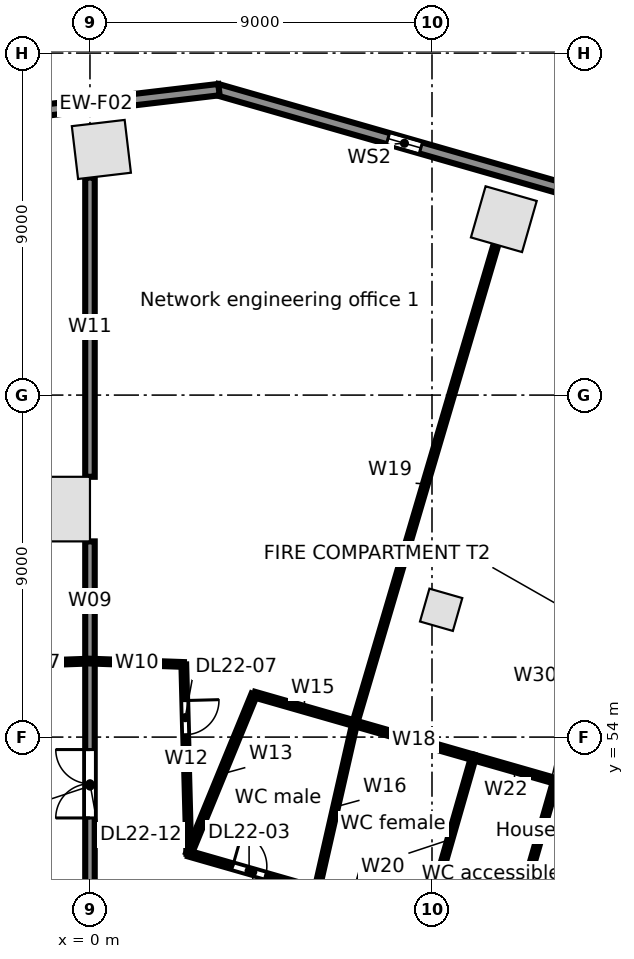
"""IFC4 building model, lengths in metres.
Left out: names, types, materials, properties, quantities, classifications, styles, units other than length and angle.
Written with IfcOpenShell. Run it as: python <this file> out.ifc"""

import sys

from ifc_helpers import new_model, si_unit, direction, frame, frame_2d, origin, origin_2d, place, context, subcontext, project, spatial, rectangle, extrude, element, fill, save


model = new_model("IFC4")
c1 = context("Model", 3, precision=1e-05, world=origin(), true_north=direction((0.0, 1.0)))
c2 = subcontext(c1, "Body", "Model", "MODEL_VIEW")
j1 = project(units=[si_unit("LENGTHUNIT", "METRE"), si_unit("PLANEANGLEUNIT", "RADIAN")], contexts=[c1])
p1 = place(None, origin())
s1 = spatial("IfcSite", under=j1, at=p1, CompositionType="ELEMENT")
p2 = place(p1, origin())
s2 = spatial("IfcBuilding", under=s1, at=p2, CompositionType="ELEMENT")
p3 = place(p2, frame((0.0, 0.0, 110.3)))
s3 = spatial("IfcBuildingStorey", under=s2, at=p3, CompositionType="ELEMENT", Elevation=110.3)
for number, where, z_axis, x_axis in (
    (1, (10.89, 67.629, 0.0), (0.0, 0.0, 1.0), (-0.961, 0.276, 0.0)),
    (2, (0.3, 69.464, 0.0), (0.0, 0.0, 1.0), (-0.993, -0.118, 0.0)),
):
    element("IfcColumn", number, at=place(p3, frame(where, z_axis=z_axis, x_axis=x_axis)), inside=s3, PredefinedType="COLUMN", context=c2, shape_type="SweptSolid", body=[
        extrude(rectangle(XDim=1.4, YDim=1.4, at=origin_2d()), origin(), (0.0, 0.0, 1.0), 4.4),
    ])
p4 = place(p3, frame((-0.85, 60.0, 0.0), z_axis=(0.0, 0.0, 1.0), x_axis=(0.0, 1.0, 0.0)))
e3 = element("IfcColumn", 3, at=p4, inside=s3, PredefinedType="COLUMN", context=c2, shape_type="SweptSolid", body=[
    extrude(rectangle(XDim=1.7, YDim=1.7, at=origin_2d()), origin(), (0.0, 0.0, 1.0), 4.4),
])
p5 = place(p3, frame((9.241, 57.35, 0.0), z_axis=(0.0, 0.0, 1.0), x_axis=(0.961261695938, -0.275637355817, 0.0)))
e4 = element("IfcColumn", 4, at=p5, inside=s3, PredefinedType="COLUMN", context=c2, shape_type="SweptSolid", body=[
    extrude(rectangle(XDim=0.9, YDim=0.9, at=origin_2d()), origin(), (0.0, 0.0, 1.0), 4.4),
])
p6 = place(p3, frame((3.335, 71.044, 0.0), z_axis=(0.0, 0.0, 1.0), x_axis=(0.961260130989, -0.275642813387, 0.0)))
e5 = element("IfcWall", 5, at=p6, inside=s3, PredefinedType="STANDARD", context=c2, shape_type="SweptSolid", body=[
    extrude(rectangle(XDim=32.741, YDim=0.3, at=frame_2d((16.371, 0.0))), origin(), (0.0, 0.0, 1.0), 4.08),
])
p7 = place(p6, frame((29.207, 0.0, 0.6)))
e6 = element("IfcOpeningElement", 6, at=p7, cuts=e5, PredefinedType="OPENING", context=c2, shape_type="SweptSolid", body=[
    extrude(rectangle(XDim=0.9, YDim=2.8, at=frame_2d((0.45, 1.4))), frame((0.0, 0.16, 0.0), z_axis=(0.0, -1.0, 0.0), x_axis=(1.0, 0.0, 0.0)), (0.0, 0.0, 1.0), 0.32),
])
p8 = place(p6, frame((21.034, 0.0, 0.6)))
e7 = element("IfcOpeningElement", 7, at=p8, cuts=e5, PredefinedType="OPENING", context=c2, shape_type="SweptSolid", body=[
    extrude(rectangle(XDim=0.9, YDim=2.8, at=frame_2d((0.45, 1.4))), frame((0.0, 0.16, 0.0), z_axis=(0.0, -1.0, 0.0), x_axis=(1.0, 0.0, 0.0)), (0.0, 0.0, 1.0), 0.32),
])
p9 = place(p6, frame((12.861, 0.0, 0.6)))
e8 = element("IfcOpeningElement", 8, at=p9, cuts=e5, PredefinedType="OPENING", context=c2, shape_type="SweptSolid", body=[
    extrude(rectangle(XDim=0.9, YDim=2.8, at=frame_2d((0.45, 1.4))), frame((0.0, 0.16, 0.0), z_axis=(0.0, -1.0, 0.0), x_axis=(1.0, 0.0, 0.0)), (0.0, 0.0, 1.0), 0.32),
])
p10 = place(p6, frame((4.688, 0.0, 0.6)))
e9 = element("IfcOpeningElement", 9, at=p10, cuts=e5, PredefinedType="OPENING", context=c2, shape_type="SweptSolid", body=[
    extrude(rectangle(XDim=0.9, YDim=2.8, at=frame_2d((0.45, 1.4))), frame((0.0, 0.16, 0.0), z_axis=(0.0, -1.0, 0.0), x_axis=(1.0, 0.0, 0.0)), (0.0, 0.0, 1.0), 0.32),
])
p11 = place(p3, frame((-3.076, 70.273, 0.0), z_axis=(0.0, 0.0, 1.0), x_axis=(0.993067743007, 0.117543429416, 0.0)))
e10 = element("IfcWall", 10, at=p11, inside=s3, PredefinedType="STANDARD", context=c2, shape_type="SweptSolid", body=[
    extrude(rectangle(XDim=6.516, YDim=0.3, at=frame_2d((3.258, 0.0))), origin(), (0.0, 0.0, 1.0), 4.08),
])
p12 = place(p3, frame((-2.67, 55.904, 0.0), z_axis=(0.0, 0.0, 1.0), x_axis=(0.999354913865, 0.03591317494, 0.0)))
e11 = element("IfcWall", 11, at=p12, inside=s3, PredefinedType="PARTITIONING", context=c2, shape_type="SweptSolid", body=[
    extrude(rectangle(XDim=2.672, YDim=0.125, at=frame_2d((1.336, 0.0))), origin(), (0.0, 0.0, 1.0), 3.142),
])
p13 = place(p3, frame((0.0, 49.422, 0.0), z_axis=(0.0, 0.0, 1.0), x_axis=(0.0, 1.0, 0.0)))
e12 = element("IfcWall", 12, at=p13, inside=s3, PredefinedType="PARTITIONING", context=c2, shape_type="SweptSolid", body=[
    extrude(rectangle(XDim=6.578, YDim=0.25, at=frame_2d((3.289, 0.0))), origin(), (0.0, 0.0, 1.0), 4.08),
])
p14 = place(p13, frame((2.45, 0.0, 0.0)))
e13 = element("IfcOpeningElement", 13, at=p14, cuts=e12, PredefinedType="OPENING", context=c2, shape_type="SweptSolid", body=[
    extrude(rectangle(XDim=1.8, YDim=2.1, at=frame_2d((0.9, 1.05))), frame((0.0, 0.135, 0.0), z_axis=(0.0, -1.0, 0.0), x_axis=(1.0, 0.0, 0.0)), (0.0, 0.0, 1.0), 0.27),
])
p15 = place(p3, frame((0.0, 56.0, 0.0), z_axis=(0.0, 0.0, 1.0), x_axis=(0.0, 1.0, 0.0)))
e14 = element("IfcWall", 14, at=p15, inside=s3, PredefinedType="PARTITIONING", context=c2, shape_type="SweptSolid", body=[
    extrude(rectangle(XDim=3.15, YDim=0.25, at=frame_2d((1.575, 0.0))), origin(), (0.0, 0.0, 1.0), 4.08),
])
p16 = place(p3, frame((0.0, 56.0, 0.0), z_axis=(0.0, 0.0, 1.0), x_axis=(0.999349313684, -0.036068673934, 0.0)))
e15 = element("IfcWall", 15, at=p16, inside=s3, PredefinedType="PARTITIONING", context=c2, shape_type="SweptSolid", body=[
    extrude(rectangle(XDim=2.471, YDim=0.125, at=frame_2d((1.235, 0.0))), origin(), (0.0, 0.0, 1.0), 4.08),
])
p17 = place(p3, frame((0.0, 60.85, 0.0), z_axis=(0.0, 0.0, 1.0), x_axis=(0.0, 1.0, 0.0)))
e16 = element("IfcWall", 16, at=p17, inside=s3, PredefinedType="PARTITIONING", context=c2, shape_type="SweptSolid", body=[
    extrude(rectangle(XDim=7.874, YDim=0.25, at=frame_2d((3.937, 0.0))), origin(), (0.0, 0.0, 1.0), 3.352),
])
p18 = place(p3, frame((2.469, 55.911, 0.0), z_axis=(0.0, 0.0, 1.0), x_axis=(0.02651808123, -0.999648333849, 0.0)))
e17 = element("IfcWall", 17, at=p18, inside=s3, PredefinedType="PARTITIONING", context=c2, shape_type="SweptSolid", body=[
    extrude(rectangle(XDim=4.981, YDim=0.125, at=frame_2d((2.49, 0.0))), origin(), (0.0, 0.0, 1.0), 4.08),
])
p19 = place(p18, frame((0.95, 0.0, 0.0)))
e18 = element("IfcOpeningElement", 18, at=p19, cuts=e17, PredefinedType="OPENING", context=c2, shape_type="SweptSolid", body=[
    extrude(rectangle(XDim=0.9, YDim=2.1, at=frame_2d((0.45, 1.05))), frame((0.0, 0.073, 0.0), z_axis=(0.0, -1.0, 0.0), x_axis=(1.0, 0.0, 0.0)), (0.0, 0.0, 1.0), 0.145),
])
p20 = place(p3, frame((2.601, 50.932, 0.0), z_axis=(0.0, 0.0, 1.0), x_axis=(0.380066317543, 0.924959239247, 0.0)))
e19 = element("IfcWall", 19, at=p20, inside=s3, PredefinedType="PARTITIONING", context=c2, shape_type="SweptSolid", body=[
    extrude(rectangle(XDim=4.528, YDim=0.15, at=frame_2d((2.264, 0.0))), origin(), (0.0, 0.0, 1.0), 4.08),
])
p21 = place(p3, frame((2.601, 50.932, 0.0), z_axis=(0.0, 0.0, 1.0), x_axis=(0.961265606965, -0.27562371608, 0.0)))
e20 = element("IfcWall", 20, at=p21, inside=s3, PredefinedType="PARTITIONING", context=c2, shape_type="SweptSolid", body=[
    extrude(rectangle(XDim=3.5, YDim=0.15, at=frame_2d((1.75, 0.0))), origin(), (0.0, 0.0, 1.0), 4.08),
])
p22 = place(p21, frame((1.2, 0.0, 0.0)))
e21 = element("IfcOpeningElement", 21, at=p22, cuts=e20, PredefinedType="OPENING", context=c2, shape_type="SweptSolid", body=[
    extrude(rectangle(XDim=0.9, YDim=2.1, at=frame_2d((0.45, 1.05))), frame((0.0, 0.085, 0.0), z_axis=(0.0, -1.0, 0.0), x_axis=(1.0, 0.0, 0.0)), (0.0, 0.0, 1.0), 0.17),
])
p23 = place(p3, frame((4.322, 55.12, 0.0), z_axis=(0.0, 0.0, 1.0), x_axis=(0.961272337704, -0.275600240865, 0.0)))
e22 = element("IfcWall", 22, at=p23, inside=s3, PredefinedType="PARTITIONING", context=c2, shape_type="SweptSolid", body=[
    extrude(rectangle(XDim=2.75, YDim=0.15, at=frame_2d((1.375, 0.0))), origin(), (0.0, 0.0, 1.0), 4.08),
])
p24 = place(p3, frame((5.966, 49.967, 0.0), z_axis=(0.0, 0.0, 1.0), x_axis=(0.221859891223, 0.975078555126, 0.0)))
e23 = element("IfcWall", 23, at=p24, inside=s3, PredefinedType="PARTITIONING", context=c2, shape_type="SweptSolid", body=[
    extrude(rectangle(XDim=4.507, YDim=0.125, at=frame_2d((2.254, 0.0))), origin(), (0.0, 0.0, 1.0), 4.08),
])
p25 = place(p3, frame((6.966, 54.362, 0.0), z_axis=(0.0, 0.0, 1.0), x_axis=(0.961245650832, -0.275693305607, 0.0)))
e24 = element("IfcWall", 24, at=p25, inside=s3, PredefinedType="PARTITIONING", context=c2, shape_type="SweptSolid", body=[
    extrude(rectangle(XDim=3.25, YDim=0.15, at=frame_2d((1.625, 0.0))), origin(), (0.0, 0.0, 1.0), 3.16),
])
p26 = place(p3, frame((6.966, 54.362, 0.0), z_axis=(0.0, 0.0, 1.0), x_axis=(0.283059793108, 0.959102264373, 0.0)))
e25 = element("IfcWall", 25, at=p26, inside=s3, PredefinedType="PARTITIONING", context=c2, shape_type="SweptSolid", body=[
    extrude(rectangle(XDim=13.135, YDim=0.125, at=frame_2d((6.567, 0.0))), origin(), (0.0, 0.0, 1.0), 3.142),
])
p27 = place(p3, frame((8.849, 49.14, 0.0), z_axis=(0.0, 0.0, 1.0), x_axis=(0.275731175537, 0.961234788612, 0.0)))
e26 = element("IfcWall", 26, at=p27, inside=s3, PredefinedType="PARTITIONING", context=c2, shape_type="SweptSolid", body=[
    extrude(rectangle(XDim=4.501, YDim=0.125, at=frame_2d((2.25, 0.0))), origin(), (0.0, 0.0, 1.0), 3.16),
])
p28 = place(p3, frame((10.09, 53.466, 0.0), z_axis=(0.0, 0.0, 1.0), x_axis=(0.961269670038, -0.275609545309, 0.0)))
e27 = element("IfcWall", 27, at=p28, inside=s3, PredefinedType="PARTITIONING", context=c2, shape_type="SweptSolid", body=[
    extrude(rectangle(XDim=2.25, YDim=0.15, at=frame_2d((1.125, 0.0))), origin(), (0.0, 0.0, 1.0), 3.142),
])
p29 = place(p3, frame((11.012, 48.52, 0.0), z_axis=(0.0, 0.0, 1.0), x_axis=(0.275745553681, 0.96123066411, 0.0)))
e28 = element("IfcWall", 28, at=p29, inside=s3, PredefinedType="PARTITIONING", context=c2, shape_type="SweptSolid", body=[
    extrude(rectangle(XDim=4.5, YDim=0.125, at=frame_2d((2.25, 0.0))), origin(), (0.0, 0.0, 1.0), 4.08),
])
p30 = place(p10, origin())
e29 = element("IfcWindow", 29, at=p30, inside=s3, PartitioningType="SINGLE_PANEL", PredefinedType="WINDOW", context=c2, shape_type="SweptSolid", body=[
    extrude(rectangle(XDim=0.9, YDim=2.8, at=frame_2d((0.45, 1.4))), frame((0.0, 0.03, 0.0), z_axis=(0.0, -1.0, 0.0), x_axis=(1.0, 0.0, 0.0)), (0.0, 0.0, 1.0), 0.06),
])
fill(e9, e29)
p31 = place(p22, origin())
e30 = element("IfcDoor", 30, at=p31, inside=s3, OperationType="SINGLE_SWING_LEFT", PredefinedType="DOOR", context=c2, shape_type="SweptSolid", body=[
    extrude(rectangle(XDim=0.9, YDim=2.1, at=frame_2d((0.45, 1.05))), frame((0.0, 0.025, 0.0), z_axis=(0.0, -1.0, 0.0), x_axis=(1.0, 0.0, 0.0)), (0.0, 0.0, 1.0), 0.05),
])
fill(e21, e30)
p32 = place(p19, origin())
e31 = element("IfcDoor", 31, at=p32, inside=s3, OperationType="SINGLE_SWING_LEFT", PredefinedType="DOOR", context=c2, shape_type="SweptSolid", body=[
    extrude(rectangle(XDim=0.9, YDim=2.1, at=frame_2d((0.45, 1.05))), frame((0.0, 0.025, 0.0), z_axis=(0.0, -1.0, 0.0), x_axis=(1.0, 0.0, 0.0)), (0.0, 0.0, 1.0), 0.05),
])
fill(e18, e31)
p33 = place(p14, origin())
e32 = element("IfcDoor", 32, at=p33, inside=s3, OperationType="DOUBLE_DOOR_SINGLE_SWING", PredefinedType="DOOR", context=c2, shape_type="SweptSolid", body=[
    extrude(rectangle(XDim=1.8, YDim=2.1, at=frame_2d((0.9, 1.05))), frame((0.0, 0.025, 0.0), z_axis=(0.0, -1.0, 0.0), x_axis=(1.0, 0.0, 0.0)), (0.0, 0.0, 1.0), 0.05),
])
fill(e13, e32)
save(model, sys.argv[1])
